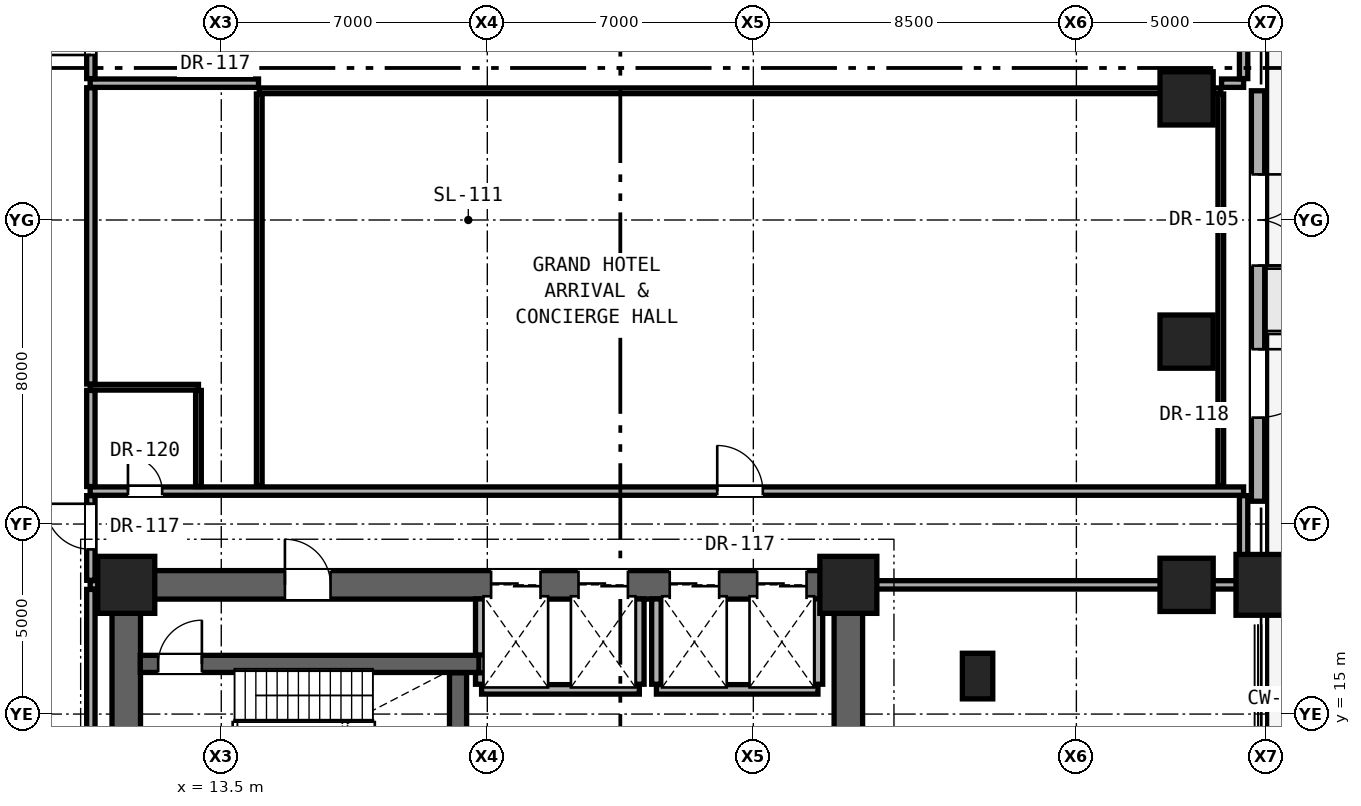
"""IFC4 building model, lengths in metres.
Left out: names, types, materials, properties, quantities, classifications, styles, units other than length and angle.
Written with IfcOpenShell. Run it as: python <this file> out.ifc"""

import sys

from ifc_helpers import new_model, si_unit, direction, frame, frame_2d, origin, origin_2d, place, context, subcontext, project, spatial, rectangle, hollow_rectangle, extrude, element, fill, save


model = new_model("IFC4")
c1 = context("Model", 3, precision=1e-05, world=origin(), true_north=direction((0.0, 1.0)))
c2 = subcontext(c1, "Body", "Model", "MODEL_VIEW")
j1 = project(units=[si_unit("LENGTHUNIT", "METRE"), si_unit("PLANEANGLEUNIT", "RADIAN")], contexts=[c1])
p1 = place(None, origin())
s1 = spatial("IfcSite", under=j1, at=p1, CompositionType="ELEMENT")
p2 = place(p1, origin())
s2 = spatial("IfcBuilding", under=s1, at=p2, CompositionType="ELEMENT")
p3 = place(p2, origin())
s3 = spatial("IfcBuildingStorey", under=s2, at=p3, CompositionType="ELEMENT", Elevation=0.0)
for number, where, z_axis, x_axis in (
    (1, (11.0, 18.4, 0.0), (0.0, 0.0, 1.0), (1.0, 0.0, 0.0)),
    (2, (30.0, 18.4, 0.0), (0.0, 0.0, 1.0), (1.0, 0.0, 0.0)),
):
    element("IfcColumn", number, at=place(p3, frame(where, z_axis=z_axis, x_axis=x_axis)), inside=s3, PredefinedType="COLUMN", context=c2, shape_type="SweptSolid", body=[
        extrude(rectangle(XDim=1.5, YDim=1.5, at=origin_2d()), origin(), (0.0, 0.0, 1.0), 5.2),
    ])
for number, where, z_axis, x_axis in (
    (3, (38.9, 18.4, 0.0), (0.0, 0.0, 1.0), (1.0, 0.0, 0.0)),
    (4, (38.9, 24.8, 0.0), (0.0, 0.0, 1.0), (1.0, 0.0, 0.0)),
    (5, (38.9, 31.2, 0.0), (0.0, 0.0, 1.0), (1.0, 0.0, 0.0)),
):
    element("IfcColumn", number, at=place(p3, frame(where, z_axis=z_axis, x_axis=x_axis)), inside=s3, PredefinedType="COLUMN", context=c2, shape_type="SweptSolid", body=[
        extrude(hollow_rectangle(XDim=1.4, YDim=1.4, WallThickness=0.08, at=origin_2d()), origin(), (0.0, 0.0, 1.0), 5.2),
    ])
p4 = place(p3, frame((33.4, 16.0, 0.0), z_axis=(0.0, 0.0, 1.0), x_axis=(1.0, 0.0, 0.0)))
e6 = element("IfcColumn", 6, at=p4, inside=s3, PredefinedType="PILASTER", context=c2, shape_type="SweptSolid", body=[
    extrude(rectangle(XDim=0.8, YDim=1.2, at=origin_2d()), origin(), (0.0, 0.0, 1.0), 5.2),
])
for number, where, z_axis, x_axis in (
    (7, (11.0, 12.4, 0.0), (0.0, 0.0, 1.0), (0.0, 1.0, 0.0)),
    (8, (30.0, 12.4, 0.0), (0.0, 0.0, 1.0), (0.0, 1.0, 0.0)),
):
    element("IfcWall", number, at=place(p3, frame(where, z_axis=z_axis, x_axis=x_axis)), inside=s3, PredefinedType="SHEAR", context=c2, shape_type="SweptSolid", body=[
        extrude(rectangle(XDim=6.0, YDim=0.75, at=frame_2d((3.0, 0.0))), origin(), (0.0, 0.0, 1.0), 4.88),
    ])
p5 = place(p3, frame((11.0, 18.4, 0.0), z_axis=(0.0, 0.0, 1.0), x_axis=(1.0, 0.0, 0.0)))
e9 = element("IfcWall", 9, at=p5, inside=s3, PredefinedType="SHEAR", context=c2, shape_type="SweptSolid", body=[
    extrude(rectangle(XDim=19.0, YDim=0.75, at=frame_2d((9.5, 0.0))), origin(), (0.0, 0.0, 1.0), 4.88),
])
p6 = place(p5, frame((4.175, 0.0, 0.0)))
e10 = element("IfcOpeningElement", 10, at=p6, cuts=e9, PredefinedType="OPENING", context=c2, shape_type="SweptSolid", body=[
    extrude(rectangle(XDim=1.2, YDim=2.25, at=frame_2d((0.6, 1.125))), frame((0.0, 0.385, 0.0), z_axis=(0.0, -1.0, 0.0), x_axis=(1.0, 0.0, 0.0)), (0.0, 0.0, 1.0), 0.77),
])
p7 = place(p5, frame((9.6, 0.0, 0.0)))
e11 = element("IfcOpeningElement", 11, at=p7, cuts=e9, PredefinedType="OPENING", context=c2, shape_type="SweptSolid", body=[
    extrude(rectangle(XDim=1.3, YDim=2.3, at=frame_2d((0.65, 1.15))), frame((0.0, 0.385, 0.0), z_axis=(0.0, -1.0, 0.0), x_axis=(1.0, 0.0, 0.0)), (0.0, 0.0, 1.0), 0.77),
])
p8 = place(p5, frame((11.9, 0.0, 0.0)))
e12 = element("IfcOpeningElement", 12, at=p8, cuts=e9, PredefinedType="OPENING", context=c2, shape_type="SweptSolid", body=[
    extrude(rectangle(XDim=1.3, YDim=2.3, at=frame_2d((0.65, 1.15))), frame((0.0, 0.385, 0.0), z_axis=(0.0, -1.0, 0.0), x_axis=(1.0, 0.0, 0.0)), (0.0, 0.0, 1.0), 0.77),
])
p9 = place(p5, frame((14.3, 0.0, 0.0)))
e13 = element("IfcOpeningElement", 13, at=p9, cuts=e9, PredefinedType="OPENING", context=c2, shape_type="SweptSolid", body=[
    extrude(rectangle(XDim=1.3, YDim=2.3, at=frame_2d((0.65, 1.15))), frame((0.0, 0.385, 0.0), z_axis=(0.0, -1.0, 0.0), x_axis=(1.0, 0.0, 0.0)), (0.0, 0.0, 1.0), 0.77),
])
p10 = place(p5, frame((16.6, 0.0, 0.0)))
e14 = element("IfcOpeningElement", 14, at=p10, cuts=e9, PredefinedType="OPENING", context=c2, shape_type="SweptSolid", body=[
    extrude(rectangle(XDim=1.3, YDim=2.3, at=frame_2d((0.65, 1.15))), frame((0.0, 0.385, 0.0), z_axis=(0.0, -1.0, 0.0), x_axis=(1.0, 0.0, 0.0)), (0.0, 0.0, 1.0), 0.77),
])
p11 = place(p3, frame((41.0, 18.4, 0.0), z_axis=(0.0, 0.0, 1.0), x_axis=(1.0, 0.0, 0.0)))
e15 = element("IfcColumn", 15, at=p11, inside=s3, PredefinedType="COLUMN", context=c2, shape_type="SweptSolid", body=[
    extrude(rectangle(XDim=1.6, YDim=1.6, at=origin_2d()), origin(), (0.0, 0.0, 1.0), 5.2),
])
p12 = place(p3, frame((40.78, 31.4, 0.0), z_axis=(0.0, 0.0, 1.0), x_axis=(0.0, -1.0, 0.0)))
e16 = element("IfcWall", 16, at=p12, inside=s3, PredefinedType="SOLIDWALL", context=c2, shape_type="SweptSolid", body=[
    extrude(rectangle(XDim=10.8, YDim=0.35, at=frame_2d((5.4, 0.0))), origin(), (0.0, 0.0, 1.0), 3.832),
])
p13 = place(p12, frame((2.2, 0.0, 0.0)))
e17 = element("IfcOpeningElement", 17, at=p13, cuts=e16, PredefinedType="OPENING", context=c2, shape_type="SweptSolid", body=[
    extrude(rectangle(XDim=2.4, YDim=2.7, at=frame_2d((1.2, 1.35))), frame((0.0, 0.185, 0.0), z_axis=(0.0, -1.0, 0.0), x_axis=(1.0, 0.0, 0.0)), (0.0, 0.0, 1.0), 0.37),
])
p14 = place(p12, frame((6.8, 0.0, 0.0)))
e18 = element("IfcOpeningElement", 18, at=p14, cuts=e16, PredefinedType="OPENING", context=c2, shape_type="SweptSolid", body=[
    extrude(rectangle(XDim=1.8, YDim=2.5, at=frame_2d((0.9, 1.25))), frame((0.0, 0.185, 0.0), z_axis=(0.0, -1.0, 0.0), x_axis=(1.0, 0.0, 0.0)), (0.0, 0.0, 1.0), 0.37),
])
p15 = place(p3, frame((20.35, 15.65, 0.0), z_axis=(0.0, 0.0, 1.0), x_axis=(1.0, 0.0, 0.0)))
e19 = element("IfcWall", 19, at=p15, inside=s3, PredefinedType="SOLIDWALL", context=c2, shape_type="SweptSolid", body=[
    extrude(rectangle(XDim=4.15, YDim=0.25, at=frame_2d((2.075, 0.0))), origin(), (0.0, 0.0, 1.0), 4.88),
])
p16 = place(p3, frame((24.95, 15.65, 0.0), z_axis=(0.0, 0.0, 1.0), x_axis=(1.0, 0.0, 0.0)))
e20 = element("IfcWall", 20, at=p16, inside=s3, PredefinedType="SOLIDWALL", context=c2, shape_type="SweptSolid", body=[
    extrude(rectangle(XDim=4.25, YDim=0.25, at=frame_2d((2.125, 0.0))), origin(), (0.0, 0.0, 1.0), 4.88),
])
p17 = place(p3, frame((11.37, 16.32, 0.0), z_axis=(0.0, 0.0, 1.0), x_axis=(1.0, 0.0, 0.0)))
e21 = element("IfcWall", 21, at=p17, inside=s3, PredefinedType="SHEAR", context=c2, shape_type="SweptSolid", body=[
    extrude(rectangle(XDim=8.91, YDim=0.45, at=frame_2d((4.455, 0.0))), origin(), (0.0, 0.0, 1.0), 4.88),
])
p18 = place(p17, frame((0.47, 0.0, 0.0)))
e22 = element("IfcOpeningElement", 22, at=p18, cuts=e21, PredefinedType="OPENING", context=c2, shape_type="SweptSolid", body=[
    extrude(rectangle(XDim=1.15, YDim=2.2, at=frame_2d((0.575, 1.1))), frame((0.0, 0.235, 0.0), z_axis=(0.0, -1.0, 0.0), x_axis=(1.0, 0.0, 0.0)), (0.0, 0.0, 1.0), 0.47),
])
p19 = place(p3, frame((10.05, 18.4, 0.0), z_axis=(0.0, 0.0, 1.0), x_axis=(1.0, 0.0, 0.0)))
e23 = element("IfcWall", 23, at=p19, inside=s3, PredefinedType="SOLIDWALL", context=c2, shape_type="SweptSolid", body=[
    extrude(rectangle(XDim=0.58, YDim=0.22, at=frame_2d((0.29, 0.0))), origin(), (0.0, 0.0, 1.0), 3.772),
])
p20 = place(p3, frame((30.37, 18.4, 0.0), z_axis=(0.0, 0.0, 1.0), x_axis=(1.0, 0.0, 0.0)))
e24 = element("IfcWall", 24, at=p20, inside=s3, PredefinedType="SOLIDWALL", context=c2, shape_type="SweptSolid", body=[
    extrude(rectangle(XDim=10.03, YDim=0.22, at=frame_2d((5.015, 0.0))), origin(), (0.0, 0.0, 1.0), 3.772),
])
p21 = place(p3, frame((10.05, 20.867, 0.0), z_axis=(0.0, 0.0, 1.0), x_axis=(1.0, 0.0, 0.0)))
e25 = element("IfcWall", 25, at=p21, inside=s3, PredefinedType="SOLIDWALL", context=c2, shape_type="SweptSolid", body=[
    extrude(rectangle(XDim=30.35, YDim=0.22, at=frame_2d((15.175, 0.0))), origin(), (0.0, 0.0, 1.0), 3.832),
])
p22 = place(p21, frame((0.995, 0.0, 0.0)))
e26 = element("IfcOpeningElement", 26, at=p22, cuts=e25, PredefinedType="OPENING", context=c2, shape_type="SweptSolid", body=[
    extrude(rectangle(XDim=0.9, YDim=2.1, at=frame_2d((0.45, 1.05))), frame((0.0, 0.12, 0.0), z_axis=(0.0, -1.0, 0.0), x_axis=(1.0, 0.0, 0.0)), (0.0, 0.0, 1.0), 0.24),
])
p23 = place(p21, frame((16.5, 0.0, 0.0)))
e27 = element("IfcOpeningElement", 27, at=p23, cuts=e25, PredefinedType="OPENING", context=c2, shape_type="SweptSolid", body=[
    extrude(rectangle(XDim=1.2, YDim=2.25, at=frame_2d((0.6, 1.125))), frame((0.0, 0.12, 0.0), z_axis=(0.0, -1.0, 0.0), x_axis=(1.0, 0.0, 0.0)), (0.0, 0.0, 1.0), 0.24),
])
p24 = place(p3, frame((10.05, 23.6, 0.0), z_axis=(0.0, 0.0, 1.0), x_axis=(1.0, 0.0, 0.0)))
e28 = element("IfcWall", 28, at=p24, inside=s3, PredefinedType="PARTITIONING", context=c2, shape_type="SweptSolid", body=[
    extrude(rectangle(XDim=2.85, YDim=0.15, at=frame_2d((1.425, 0.0))), origin(), (0.0, 0.0, 1.0), 3.832),
])
p25 = place(p3, frame((14.5, 31.4, 0.0), z_axis=(0.0, 0.0, 1.0), x_axis=(1.0, 0.0, 0.0)))
e29 = element("IfcWall", 29, at=p25, inside=s3, PredefinedType="PARTITIONING", context=c2, shape_type="SweptSolid", body=[
    extrude(rectangle(XDim=25.3, YDim=0.15, at=frame_2d((12.65, 0.0))), origin(), (0.0, 0.0, 1.0), 3.832),
])
p26 = place(p3, frame((10.05, 31.6, 0.0), z_axis=(0.0, 0.0, 1.0), x_axis=(1.0, 0.0, 0.0)))
e30 = element("IfcWall", 30, at=p26, inside=s3, PredefinedType="SOLIDWALL", context=c2, shape_type="SweptSolid", body=[
    extrude(rectangle(XDim=4.43, YDim=0.22, at=frame_2d((2.215, 0.0))), origin(), (0.0, 0.0, 1.0), 3.832),
])
p27 = place(p3, frame((39.82, 31.6, 0.0), z_axis=(0.0, 0.0, 1.0), x_axis=(1.0, 0.0, 0.0)))
e31 = element("IfcWall", 31, at=p27, inside=s3, PredefinedType="SOLIDWALL", context=c2, shape_type="SweptSolid", body=[
    extrude(rectangle(XDim=0.58, YDim=0.22, at=frame_2d((0.29, 0.0))), origin(), (0.0, 0.0, 1.0), 4.88),
])
p28 = place(p3, frame((10.069, 12.77, 0.0), z_axis=(0.0, 0.0, 1.0), x_axis=(0.0, 1.0, 0.0)))
e32 = element("IfcWall", 32, at=p28, inside=s3, PredefinedType="SOLIDWALL", context=c2, shape_type="SweptSolid", body=[
    extrude(rectangle(XDim=5.51, YDim=0.22, at=frame_2d((2.755, 0.0))), origin(), (0.0, 0.0, 1.0), 3.772),
])
p29 = place(p3, frame((10.069, 18.52, 0.0), z_axis=(0.0, 0.0, 1.0), x_axis=(0.0, 1.0, 0.0)))
e33 = element("IfcWall", 33, at=p29, inside=s3, PredefinedType="SOLIDWALL", context=c2, shape_type="SweptSolid", body=[
    extrude(rectangle(XDim=2.227, YDim=0.22, at=frame_2d((1.113, 0.0))), origin(), (0.0, 0.0, 1.0), 3.772),
])
p30 = place(p29, frame((0.813, 0.0, 0.0)))
e34 = element("IfcOpeningElement", 34, at=p30, cuts=e33, PredefinedType="OPENING", context=c2, shape_type="SweptSolid", body=[
    extrude(rectangle(XDim=1.2, YDim=2.25, at=frame_2d((0.6, 1.125))), frame((0.0, 0.12, 0.0), z_axis=(0.0, -1.0, 0.0), x_axis=(1.0, 0.0, 0.0)), (0.0, 0.0, 1.0), 0.24),
])
p31 = place(p3, frame((10.069, 20.987, 0.0), z_axis=(0.0, 0.0, 1.0), x_axis=(0.0, 1.0, 0.0)))
e35 = element("IfcWall", 35, at=p31, inside=s3, PredefinedType="SOLIDWALL", context=c2, shape_type="SweptSolid", body=[
    extrude(rectangle(XDim=2.528, YDim=0.22, at=frame_2d((1.264, 0.0))), origin(), (0.0, 0.0, 1.0), 4.88),
])
p32 = place(p3, frame((10.069, 23.685, 0.0), z_axis=(0.0, 0.0, 1.0), x_axis=(0.0, 1.0, 0.0)))
e36 = element("IfcWall", 36, at=p32, inside=s3, PredefinedType="SOLIDWALL", context=c2, shape_type="SweptSolid", body=[
    extrude(rectangle(XDim=7.795, YDim=0.22, at=frame_2d((3.897, 0.0))), origin(), (0.0, 0.0, 1.0), 4.099),
])
p33 = place(p3, frame((10.069, 31.72, 0.0), z_axis=(0.0, 0.0, 1.0), x_axis=(0.0, 1.0, 0.0)))
e37 = element("IfcWall", 37, at=p33, inside=s3, PredefinedType="SOLIDWALL", context=c2, shape_type="SweptSolid", body=[
    extrude(rectangle(XDim=2.443, YDim=0.22, at=frame_2d((1.222, 0.0))), origin(), (0.0, 0.0, 1.0), 4.88),
])
p34 = place(p33, frame((0.622, 0.0, 0.0)))
e38 = element("IfcOpeningElement", 38, at=p34, cuts=e37, PredefinedType="OPENING", context=c2, shape_type="SweptSolid", body=[
    extrude(rectangle(XDim=1.2, YDim=2.25, at=frame_2d((0.6, 1.125))), frame((0.0, 0.12, 0.0), z_axis=(0.0, -1.0, 0.0), x_axis=(1.0, 0.0, 0.0)), (0.0, 0.0, 1.0), 0.24),
])
p35 = place(p3, frame((12.9, 20.987, 0.0), z_axis=(0.0, 0.0, 1.0), x_axis=(0.0, 1.0, 0.0)))
e39 = element("IfcWall", 39, at=p35, inside=s3, PredefinedType="PARTITIONING", context=c2, shape_type="SweptSolid", body=[
    extrude(rectangle(XDim=2.528, YDim=0.15, at=frame_2d((1.264, 0.0))), origin(), (0.0, 0.0, 1.0), 4.88),
])
p36 = place(p3, frame((14.5, 21.0, 0.0), z_axis=(0.0, 0.0, 1.0), x_axis=(0.0, 1.0, 0.0)))
e40 = element("IfcWall", 40, at=p36, inside=s3, PredefinedType="PARTITIONING", context=c2, shape_type="SweptSolid", body=[
    extrude(rectangle(XDim=10.315, YDim=0.15, at=frame_2d((5.157, 0.0))), origin(), (0.0, 0.0, 1.0), 3.832),
])
p37 = place(p3, frame((19.73, 13.355, 0.0), z_axis=(0.0, 0.0, 1.0), x_axis=(0.0, 1.0, 0.0)))
e41 = element("IfcWall", 41, at=p37, inside=s3, PredefinedType="SHEAR", context=c2, shape_type="SweptSolid", body=[
    extrude(rectangle(XDim=2.73, YDim=0.45, at=frame_2d((1.365, 0.0))), origin(), (0.0, 0.0, 1.0), 4.88),
])
p38 = place(p3, frame((20.315, 15.785, 0.0), z_axis=(0.0, 0.0, 1.0), x_axis=(0.0, 1.0, 0.0)))
e42 = element("IfcWall", 42, at=p38, inside=s3, PredefinedType="SOLIDWALL", context=c2, shape_type="SweptSolid", body=[
    extrude(rectangle(XDim=0.3, YDim=0.25, at=frame_2d((0.15, 0.0))), origin(), (0.0, 0.0, 1.0), 4.88),
])
p39 = place(p3, frame((20.315, 16.555, 0.0), z_axis=(0.0, 0.0, 1.0), x_axis=(0.0, 1.0, 0.0)))
e43 = element("IfcWall", 43, at=p39, inside=s3, PredefinedType="SOLIDWALL", context=c2, shape_type="SweptSolid", body=[
    extrude(rectangle(XDim=1.475, YDim=0.25, at=frame_2d((0.738, 0.0))), origin(), (0.0, 0.0, 1.0), 4.88),
])
for number, where, z_axis, x_axis in (
    (44, (24.5, 15.785, 0.0), (0.0, 0.0, 1.0), (0.0, 1.0, 0.0)),
    (45, (24.95, 15.785, 0.0), (0.0, 0.0, 1.0), (0.0, 1.0, 0.0)),
    (46, (29.2, 15.785, 0.0), (0.0, 0.0, 1.0), (0.0, 1.0, 0.0)),
):
    element("IfcWall", number, at=place(p3, frame(where, z_axis=z_axis, x_axis=x_axis)), inside=s3, PredefinedType="SOLIDWALL", context=c2, shape_type="SweptSolid", body=[
        extrude(rectangle(XDim=2.245, YDim=0.25, at=frame_2d((1.123, 0.0))), origin(), (0.0, 0.0, 1.0), 4.88),
    ])
p40 = place(p3, frame((39.8, 21.0, 0.0), z_axis=(0.0, 0.0, 1.0), x_axis=(0.0, 1.0, 0.0)))
e47 = element("IfcWall", 47, at=p40, inside=s3, PredefinedType="PARTITIONING", context=c2, shape_type="SweptSolid", body=[
    extrude(rectangle(XDim=10.315, YDim=0.15, at=frame_2d((5.157, 0.0))), origin(), (0.0, 0.0, 1.0), 4.88),
])
p41 = place(p3, frame((40.4, 18.52, 0.0), z_axis=(0.0, 0.0, 1.0), x_axis=(0.0, 1.0, 0.0)))
e48 = element("IfcWall", 48, at=p41, inside=s3, PredefinedType="SOLIDWALL", context=c2, shape_type="SweptSolid", body=[
    extrude(rectangle(XDim=2.227, YDim=0.22, at=frame_2d((1.113, 0.0))), origin(), (0.0, 0.0, 1.0), 3.924),
])
p42 = place(p3, frame((40.4, 31.72, 0.0), z_axis=(0.0, 0.0, 1.0), x_axis=(0.0, 1.0, 0.0)))
e49 = element("IfcWall", 49, at=p42, inside=s3, PredefinedType="SOLIDWALL", context=c2, shape_type="SweptSolid", body=[
    extrude(rectangle(XDim=2.443, YDim=0.22, at=frame_2d((1.222, 0.0))), origin(), (0.0, 0.0, 1.0), 4.88),
])
p43 = place(p13, origin())
e50 = element("IfcDoor", 50, at=p43, inside=s3, OperationType="DOUBLE_DOOR_SINGLE_SWING", PredefinedType="DOOR", context=c2, shape_type="SweptSolid", body=[
    extrude(rectangle(XDim=2.4, YDim=2.7, at=frame_2d((1.2, 1.35))), frame((0.0, 0.025, 0.0), z_axis=(0.0, -1.0, 0.0), x_axis=(1.0, 0.0, 0.0)), (0.0, 0.0, 1.0), 0.05),
])
fill(e17, e50)
p44 = place(p14, origin())
e51 = element("IfcDoor", 51, at=p44, inside=s3, OperationType="SINGLE_SWING_LEFT", PredefinedType="DOOR", context=c2, shape_type="SweptSolid", body=[
    extrude(rectangle(XDim=1.8, YDim=2.5, at=frame_2d((0.9, 1.25))), frame((0.0, 0.025, 0.0), z_axis=(0.0, -1.0, 0.0), x_axis=(1.0, 0.0, 0.0)), (0.0, 0.0, 1.0), 0.05),
])
fill(e18, e51)
p45 = place(p30, origin())
e52 = element("IfcDoor", 52, at=p45, inside=s3, OperationType="SINGLE_SWING_RIGHT", PredefinedType="DOOR", context=c2, shape_type="SweptSolid", body=[
    extrude(rectangle(XDim=1.2, YDim=2.25, at=frame_2d((0.6, 1.125))), frame((0.0, 0.025, 0.0), z_axis=(0.0, -1.0, 0.0), x_axis=(1.0, 0.0, 0.0)), (0.0, 0.0, 1.0), 0.05),
])
fill(e34, e52)
p46 = place(p34, origin())
e53 = element("IfcDoor", 53, at=p46, inside=s3, OperationType="SINGLE_SWING_LEFT", PredefinedType="DOOR", context=c2, shape_type="SweptSolid", body=[
    extrude(rectangle(XDim=1.2, YDim=2.25, at=frame_2d((0.6, 1.125))), frame((0.0, 0.025, 0.0), z_axis=(0.0, -1.0, 0.0), x_axis=(1.0, 0.0, 0.0)), (0.0, 0.0, 1.0), 0.05),
])
fill(e38, e53)
p47 = place(p6, origin())
e54 = element("IfcDoor", 54, at=p47, inside=s3, OperationType="SINGLE_SWING_LEFT", PredefinedType="DOOR", context=c2, shape_type="SweptSolid", body=[
    extrude(rectangle(XDim=1.2, YDim=2.25, at=frame_2d((0.6, 1.125))), frame((0.0, 0.025, 0.0), z_axis=(0.0, -1.0, 0.0), x_axis=(1.0, 0.0, 0.0)), (0.0, 0.0, 1.0), 0.05),
])
fill(e10, e54)
p48 = place(p18, origin())
e55 = element("IfcDoor", 55, at=p48, inside=s3, OperationType="SINGLE_SWING_RIGHT", PredefinedType="DOOR", context=c2, shape_type="SweptSolid", body=[
    extrude(rectangle(XDim=1.15, YDim=2.2, at=frame_2d((0.575, 1.1))), frame((0.0, 0.025, 0.0), z_axis=(0.0, -1.0, 0.0), x_axis=(1.0, 0.0, 0.0)), (0.0, 0.0, 1.0), 0.05),
])
fill(e22, e55)
p49 = place(p22, origin())
e56 = element("IfcDoor", 56, at=p49, inside=s3, OperationType="SINGLE_SWING_LEFT", PredefinedType="DOOR", context=c2, shape_type="SweptSolid", body=[
    extrude(rectangle(XDim=0.9, YDim=2.1, at=frame_2d((0.45, 1.05))), frame((0.0, 0.025, 0.0), z_axis=(0.0, -1.0, 0.0), x_axis=(1.0, 0.0, 0.0)), (0.0, 0.0, 1.0), 0.05),
])
fill(e26, e56)
p50 = place(p23, origin())
e57 = element("IfcDoor", 57, at=p50, inside=s3, OperationType="SINGLE_SWING_LEFT", PredefinedType="DOOR", context=c2, shape_type="SweptSolid", body=[
    extrude(rectangle(XDim=1.2, YDim=2.25, at=frame_2d((0.6, 1.125))), frame((0.0, 0.025, 0.0), z_axis=(0.0, -1.0, 0.0), x_axis=(1.0, 0.0, 0.0)), (0.0, 0.0, 1.0), 0.05),
])
fill(e27, e57)
p51 = place(p7, origin())
e58 = element("IfcDoor", 58, at=p51, inside=s3, OperationType="DOUBLE_DOOR_SLIDING", PredefinedType="DOOR", context=c2, shape_type="SweptSolid", body=[
    extrude(rectangle(XDim=1.3, YDim=2.3, at=frame_2d((0.65, 1.15))), frame((0.0, 0.025, 0.0), z_axis=(0.0, -1.0, 0.0), x_axis=(1.0, 0.0, 0.0)), (0.0, 0.0, 1.0), 0.05),
])
fill(e11, e58)
p52 = place(p8, origin())
e59 = element("IfcDoor", 59, at=p52, inside=s3, OperationType="DOUBLE_DOOR_SLIDING", PredefinedType="DOOR", context=c2, shape_type="SweptSolid", body=[
    extrude(rectangle(XDim=1.3, YDim=2.3, at=frame_2d((0.65, 1.15))), frame((0.0, 0.025, 0.0), z_axis=(0.0, -1.0, 0.0), x_axis=(1.0, 0.0, 0.0)), (0.0, 0.0, 1.0), 0.05),
])
fill(e12, e59)
p53 = place(p9, origin())
e60 = element("IfcDoor", 60, at=p53, inside=s3, OperationType="DOUBLE_DOOR_SLIDING", PredefinedType="DOOR", context=c2, shape_type="SweptSolid", body=[
    extrude(rectangle(XDim=1.3, YDim=2.3, at=frame_2d((0.65, 1.15))), frame((0.0, 0.025, 0.0), z_axis=(0.0, -1.0, 0.0), x_axis=(1.0, 0.0, 0.0)), (0.0, 0.0, 1.0), 0.05),
])
fill(e13, e60)
p54 = place(p10, origin())
e61 = element("IfcDoor", 61, at=p54, inside=s3, OperationType="DOUBLE_DOOR_SLIDING", PredefinedType="DOOR", context=c2, shape_type="SweptSolid", body=[
    extrude(rectangle(XDim=1.3, YDim=2.3, at=frame_2d((0.65, 1.15))), frame((0.0, 0.025, 0.0), z_axis=(0.0, -1.0, 0.0), x_axis=(1.0, 0.0, 0.0)), (0.0, 0.0, 1.0), 0.05),
])
fill(e14, e61)
save(model, sys.argv[1])
